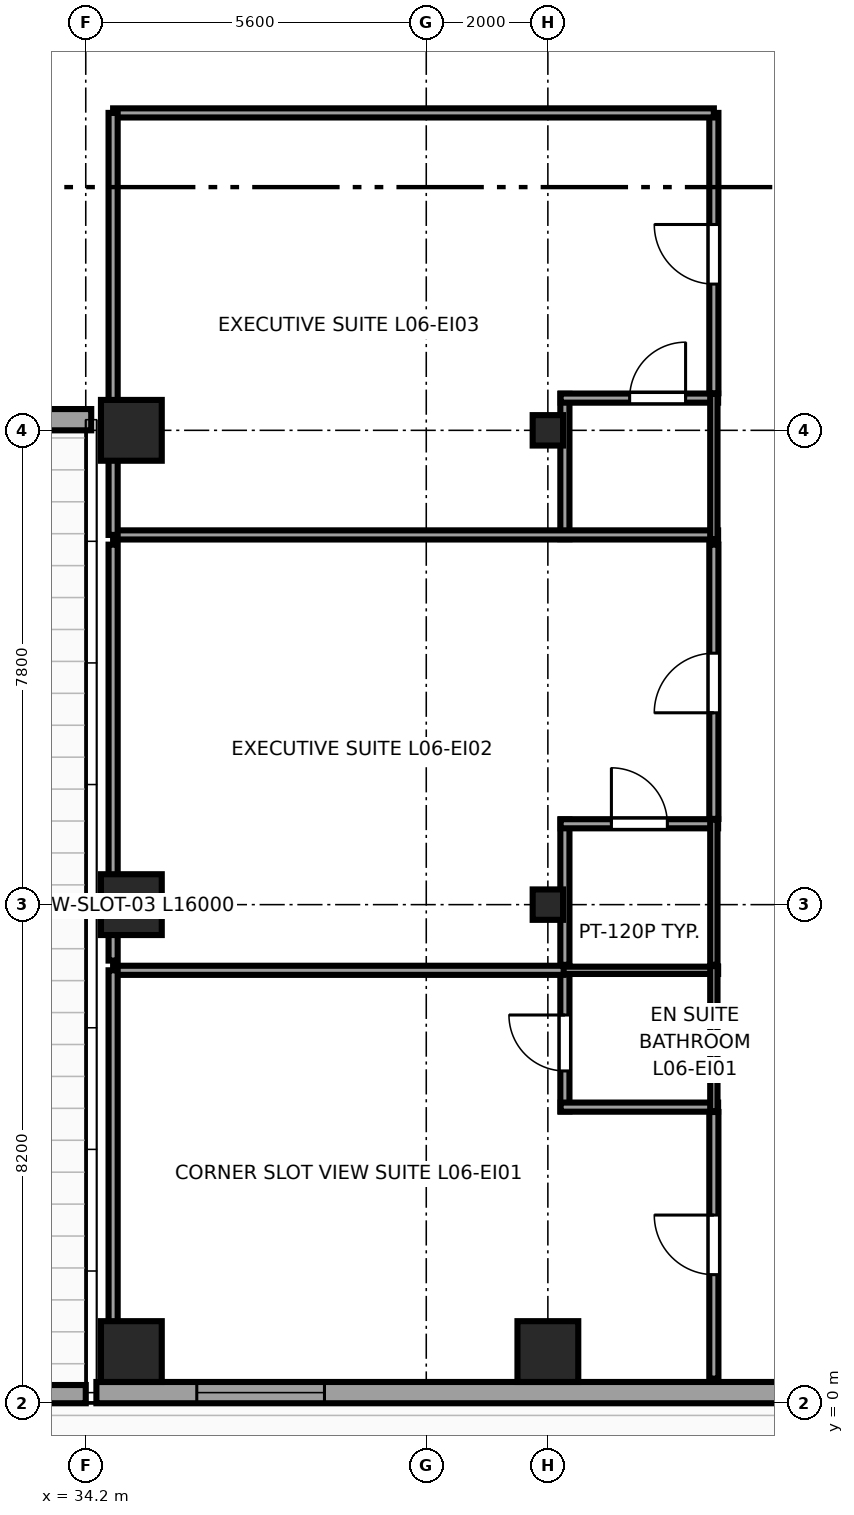
"""IFC4 building model, lengths in metres.
Left out: names, types, materials, properties, quantities, classifications, styles, units other than length and angle.
Written with IfcOpenShell. Run it as: python <this file> out.ifc"""

import sys

from ifc_helpers import new_model, si_unit, direction, frame, frame_2d, origin, origin_2d, place, context, subcontext, project, spatial, rectangle, i_section, extrude, source, transform, mapped, element, fill, save


model = new_model("IFC4")
c1 = context("Model", 3, precision=1e-05, world=origin(), true_north=direction((0.0, 1.0)))
c2 = subcontext(c1, "Body", "Model", "MODEL_VIEW")
j1 = project(units=[si_unit("LENGTHUNIT", "METRE"), si_unit("PLANEANGLEUNIT", "RADIAN")], contexts=[c1])
p1 = place(None, origin())
s1 = spatial("IfcSite", under=j1, at=p1, CompositionType="ELEMENT")
p2 = place(p1, origin())
s2 = spatial("IfcBuilding", under=s1, at=p2, CompositionType="ELEMENT")
p3 = place(p2, frame((0.0, 0.0, 32.0)))
s3 = spatial("IfcBuildingStorey", under=s2, at=p3, CompositionType="ELEMENT", Elevation=32.0)
m1 = source(origin(), c2, "Body", "SweptSolid", [
    extrude(rectangle(XDim=1.0, YDim=1.0, at=origin_2d()), origin(), (0.0, 0.0, 1.0), 3.55),
])
for number, where, z_axis, x_axis in (
    (1, (34.95, 0.85, 0.0), (0.0, 0.0, 1.0), (1.0, 0.0, 0.0)),
    (2, (34.95, 8.2, 0.0), (0.0, 0.0, 1.0), (1.0, 0.0, 0.0)),
    (3, (34.95, 16.0, 0.0), (0.0, 0.0, 1.0), (1.0, 0.0, 0.0)),
    (4, (41.8, 0.85, 0.0), (0.0, 0.0, 1.0), (1.0, 0.0, 0.0)),
):
    element("IfcColumn", number, at=place(p3, frame(where, z_axis=z_axis, x_axis=x_axis)), inside=s3, PredefinedType="COLUMN", context=c2, shape_type="MappedRepresentation", body=[
        mapped(m1, transform((0.0, 0.0, 0.0), x_axis=(1.0, 0.0, 0.0), y_axis=(0.0, 1.0, 0.0), z_axis=(0.0, 0.0, 1.0), scale=1.0)),
    ])
m2 = source(origin(), c2, "Body", "SweptSolid", [
    extrude(i_section(OverallWidth=0.5, OverallDepth=0.5, WebThickness=0.028, FlangeThickness=0.045, at=origin_2d()), origin(), (0.0, 0.0, 1.0), 3.55),
])
for number, where, z_axis, x_axis in (
    (5, (41.8, 8.2, 0.0), (0.0, 0.0, 1.0), (1.0, 0.0, 0.0)),
    (6, (41.8, 16.0, 0.0), (0.0, 0.0, 1.0), (1.0, 0.0, 0.0)),
):
    element("IfcColumn", number, at=place(p3, frame(where, z_axis=z_axis, x_axis=x_axis)), inside=s3, PredefinedType="COLUMN", context=c2, shape_type="MappedRepresentation", body=[
        mapped(m2, transform((0.0, 0.0, 0.0), x_axis=(1.0, 0.0, 0.0), y_axis=(0.0, 1.0, 0.0), z_axis=(0.0, 0.0, 1.0), scale=1.0)),
    ])
p4 = place(p3, frame((22.71, 16.175, 0.0), z_axis=(0.0, 0.0, 1.0), x_axis=(1.0, 0.0, 0.0)))
e7 = element("IfcWall", 7, at=p4, inside=s3, PredefinedType="SOLIDWALL", context=c2, shape_type="SweptSolid", body=[
    extrude(rectangle(XDim=11.58, YDim=0.35, at=frame_2d((5.79, 0.0))), origin(), (0.0, 0.0, 1.0), 2.748),
])
p5 = place(p4, frame((2.145, 0.0, 0.68)))
e8 = element("IfcOpeningElement", 8, at=p5, cuts=e7, PredefinedType="OPENING", context=c2, shape_type="SweptSolid", body=[
    extrude(rectangle(XDim=2.1, YDim=1.9, at=frame_2d((1.05, 0.95))), frame((0.0, 0.185, 0.0), z_axis=(0.0, -1.0, 0.0), x_axis=(1.0, 0.0, 0.0)), (0.0, 0.0, 1.0), 0.37),
])
p6 = place(p4, frame((7.335, 0.0, 0.68)))
e9 = element("IfcOpeningElement", 9, at=p6, cuts=e7, PredefinedType="OPENING", context=c2, shape_type="SweptSolid", body=[
    extrude(rectangle(XDim=2.1, YDim=1.9, at=frame_2d((1.05, 0.95))), frame((0.0, 0.185, 0.0), z_axis=(0.0, -1.0, 0.0), x_axis=(1.0, 0.0, 0.0)), (0.0, 0.0, 1.0), 0.37),
])
p7 = place(p3, frame((34.375, 0.175, 0.0), z_axis=(0.0, 0.0, 1.0), x_axis=(1.0, 0.0, 0.0)))
e10 = element("IfcWall", 10, at=p7, inside=s3, PredefinedType="SOLIDWALL", context=c2, shape_type="SweptSolid", body=[
    extrude(rectangle(XDim=18.008, YDim=0.35, at=frame_2d((9.004, 0.0))), origin(), (0.0, 0.0, 1.0), 3.37),
])
p8 = place(p7, frame((1.651, 0.0, 0.68)))
e11 = element("IfcOpeningElement", 11, at=p8, cuts=e10, PredefinedType="OPENING", context=c2, shape_type="SweptSolid", body=[
    extrude(rectangle(XDim=2.1, YDim=1.9, at=frame_2d((1.05, 0.95))), frame((0.0, 0.185, 0.0), z_axis=(0.0, -1.0, 0.0), x_axis=(1.0, 0.0, 0.0)), (0.0, 0.0, 1.0), 0.37),
])
p9 = place(p7, frame((15.725, 0.0, 0.62)))
e12 = element("IfcOpeningElement", 12, at=p9, cuts=e10, PredefinedType="OPENING", context=c2, shape_type="SweptSolid", body=[
    extrude(rectangle(XDim=1.5, YDim=1.55, at=frame_2d((0.75, 0.775))), frame((0.0, 0.185, 0.0), z_axis=(0.0, -1.0, 0.0), x_axis=(1.0, 0.0, 0.0)), (0.0, 0.0, 1.0), 0.37),
])
p10 = place(p3, frame((22.8, 0.15, 0.0), z_axis=(0.0, 0.0, 1.0), x_axis=(1.0, 0.0, 0.0)))
e13 = element("IfcWall", 13, at=p10, inside=s3, PredefinedType="PARAPET", context=c2, shape_type="SweptSolid", body=[
    extrude(rectangle(XDim=11.4, YDim=0.3, at=frame_2d((5.7, 0.0))), origin(), (0.0, 0.0, 1.0), 1.15),
])
p11 = place(p3, frame((42.08, 4.8, 0.0), z_axis=(0.0, 0.0, 1.0), x_axis=(0.0, 1.0, 0.0)))
e14 = element("IfcWall", 14, at=p11, inside=s3, PredefinedType="PARTITIONING", context=c2, shape_type="SweptSolid", body=[
    extrude(rectangle(XDim=2.39, YDim=0.15, at=frame_2d((1.195, 0.0))), origin(), (0.0, 0.0, 1.0), 3.37),
])
p12 = place(p11, frame((0.665, 0.0, 0.0)))
e15 = element("IfcOpeningElement", 15, at=p12, cuts=e14, PredefinedType="OPENING", context=c2, shape_type="SweptSolid", body=[
    extrude(rectangle(XDim=0.92, YDim=2.01, at=frame_2d((0.46, 1.005))), frame((0.0, 0.085, 0.0), z_axis=(0.0, -1.0, 0.0), x_axis=(1.0, 0.0, 0.0)), (0.0, 0.0, 1.0), 0.17),
])
p13 = place(p3, frame((42.01, 4.87, 0.0), z_axis=(0.0, 0.0, 1.0), x_axis=(1.0, 0.0, 0.0)))
e16 = element("IfcWall", 16, at=p13, inside=s3, PredefinedType="PARTITIONING", context=c2, shape_type="SweptSolid", body=[
    extrude(rectangle(XDim=2.59, YDim=0.15, at=frame_2d((1.295, 0.0))), origin(), (0.0, 0.0, 1.0), 3.37),
])
p14 = place(p3, frame((42.01, 7.12, 0.0), z_axis=(0.0, 0.0, 1.0), x_axis=(1.0, 0.0, 0.0)))
e17 = element("IfcWall", 17, at=p14, inside=s3, PredefinedType="PLUMBINGWALL", context=c2, shape_type="SweptSolid", body=[
    extrude(rectangle(XDim=2.59, YDim=0.12, at=frame_2d((1.295, 0.0))), origin(), (0.0, 0.0, 1.0), 3.37),
])
p15 = place(p3, frame((44.53, 4.8, 0.0), z_axis=(0.0, 0.0, 1.0), x_axis=(0.0, 1.0, 0.0)))
e18 = element("IfcWall", 18, at=p15, inside=s3, PredefinedType="PLUMBINGWALL", context=c2, shape_type="SweptSolid", body=[
    extrude(rectangle(XDim=2.39, YDim=0.12, at=frame_2d((1.195, 0.0))), origin(), (0.0, 0.0, 1.0), 3.37),
])
p16 = place(p3, frame((42.08, 7.21, 0.0), z_axis=(0.0, 0.0, 1.0), x_axis=(0.0, 1.0, 0.0)))
e19 = element("IfcWall", 19, at=p16, inside=s3, PredefinedType="PARTITIONING", context=c2, shape_type="SweptSolid", body=[
    extrude(rectangle(XDim=2.39, YDim=0.15, at=frame_2d((1.195, 0.0))), origin(), (0.0, 0.0, 1.0), 3.37),
])
p17 = place(p3, frame((42.01, 9.53, 0.0), z_axis=(0.0, 0.0, 1.0), x_axis=(1.0, 0.0, 0.0)))
e20 = element("IfcWall", 20, at=p17, inside=s3, PredefinedType="PARTITIONING", context=c2, shape_type="SweptSolid", body=[
    extrude(rectangle(XDim=2.59, YDim=0.15, at=frame_2d((1.295, 0.0))), origin(), (0.0, 0.0, 1.0), 3.37),
])
p18 = place(p17, frame((0.835, 0.0, 0.0)))
e21 = element("IfcOpeningElement", 21, at=p18, cuts=e20, PredefinedType="OPENING", context=c2, shape_type="SweptSolid", body=[
    extrude(rectangle(XDim=0.92, YDim=2.01, at=frame_2d((0.46, 1.005))), frame((0.0, 0.085, 0.0), z_axis=(0.0, -1.0, 0.0), x_axis=(1.0, 0.0, 0.0)), (0.0, 0.0, 1.0), 0.17),
])
p19 = place(p3, frame((44.53, 7.21, 0.0), z_axis=(0.0, 0.0, 1.0), x_axis=(0.0, 1.0, 0.0)))
e22 = element("IfcWall", 22, at=p19, inside=s3, PredefinedType="PLUMBINGWALL", context=c2, shape_type="SweptSolid", body=[
    extrude(rectangle(XDim=2.39, YDim=0.12, at=frame_2d((1.195, 0.0))), origin(), (0.0, 0.0, 1.0), 3.37),
])
p20 = place(p3, frame((42.08, 14.21, 0.0), z_axis=(0.0, 0.0, 1.0), x_axis=(0.0, 1.0, 0.0)))
e23 = element("IfcWall", 23, at=p20, inside=s3, PredefinedType="PARTITIONING", context=c2, shape_type="SweptSolid", body=[
    extrude(rectangle(XDim=2.39, YDim=0.15, at=frame_2d((1.195, 0.0))), origin(), (0.0, 0.0, 1.0), 3.37),
])
p21 = place(p3, frame((34.65, 14.28, 0.0), z_axis=(0.0, 0.0, 1.0), x_axis=(1.0, 0.0, 0.0)))
e24 = element("IfcWall", 24, at=p21, inside=s3, PredefinedType="PARTITIONING", context=c2, shape_type="SweptSolid", body=[
    extrude(rectangle(XDim=9.95, YDim=0.15, at=frame_2d((4.975, 0.0))), origin(), (0.0, 0.0, 1.0), 3.37),
])
p22 = place(p3, frame((42.01, 16.53, 0.0), z_axis=(0.0, 0.0, 1.0), x_axis=(1.0, 0.0, 0.0)))
e25 = element("IfcWall", 25, at=p22, inside=s3, PredefinedType="PARTITIONING", context=c2, shape_type="SweptSolid", body=[
    extrude(rectangle(XDim=2.59, YDim=0.15, at=frame_2d((1.295, 0.0))), origin(), (0.0, 0.0, 1.0), 3.37),
])
p23 = place(p22, frame((1.135, 0.0, 0.0)))
e26 = element("IfcOpeningElement", 26, at=p23, cuts=e25, PredefinedType="OPENING", context=c2, shape_type="SweptSolid", body=[
    extrude(rectangle(XDim=0.92, YDim=2.01, at=frame_2d((0.46, 1.005))), frame((0.0, 0.085, 0.0), z_axis=(0.0, -1.0, 0.0), x_axis=(1.0, 0.0, 0.0)), (0.0, 0.0, 1.0), 0.17),
])
p24 = place(p3, frame((44.53, 14.21, 0.0), z_axis=(0.0, 0.0, 1.0), x_axis=(0.0, 1.0, 0.0)))
e27 = element("IfcWall", 27, at=p24, inside=s3, PredefinedType="PLUMBINGWALL", context=c2, shape_type="SweptSolid", body=[
    extrude(rectangle(XDim=2.39, YDim=0.12, at=frame_2d((1.195, 0.0))), origin(), (0.0, 0.0, 1.0), 3.37),
])
p25 = place(p3, frame((44.53, 0.405, 0.0), z_axis=(0.0, 0.0, 1.0), x_axis=(0.0, 1.0, 0.0)))
e28 = element("IfcWall", 28, at=p25, inside=s3, PredefinedType="PARTITIONING", context=c2, shape_type="SweptSolid", body=[
    extrude(rectangle(XDim=4.385, YDim=0.15, at=frame_2d((2.192, 0.0))), origin(), (0.0, 0.0, 1.0), 3.37),
])
p26 = place(p25, frame((1.71, 0.0, 0.0)))
e29 = element("IfcOpeningElement", 29, at=p26, cuts=e28, PredefinedType="OPENING", context=c2, shape_type="SweptSolid", body=[
    extrude(rectangle(XDim=0.98, YDim=2.12, at=frame_2d((0.49, 1.06))), frame((0.0, 0.085, 0.0), z_axis=(0.0, -1.0, 0.0), x_axis=(1.0, 0.0, 0.0)), (0.0, 0.0, 1.0), 0.17),
])
p27 = place(p3, frame((34.65, 7.12, 0.0), z_axis=(0.0, 0.0, 1.0), x_axis=(1.0, 0.0, 0.0)))
e30 = element("IfcWall", 30, at=p27, inside=s3, PredefinedType="PARTITIONING", context=c2, shape_type="SweptSolid", body=[
    extrude(rectangle(XDim=7.41, YDim=0.15, at=frame_2d((3.705, 0.0))), origin(), (0.0, 0.0, 1.0), 3.37),
])
p28 = place(p3, frame((34.65, 0.405, 0.0), z_axis=(0.0, 0.0, 1.0), x_axis=(0.0, 1.0, 0.0)))
e31 = element("IfcWall", 31, at=p28, inside=s3, PredefinedType="PARTITIONING", context=c2, shape_type="SweptSolid", body=[
    extrude(rectangle(XDim=6.715, YDim=0.15, at=frame_2d((3.357, 0.0))), origin(), (0.0, 0.0, 1.0), 3.37),
])
p29 = place(p3, frame((44.53, 9.61, 0.0), z_axis=(0.0, 0.0, 1.0), x_axis=(0.0, 1.0, 0.0)))
e32 = element("IfcWall", 32, at=p29, inside=s3, PredefinedType="PARTITIONING", context=c2, shape_type="SweptSolid", body=[
    extrude(rectangle(XDim=4.51, YDim=0.15, at=frame_2d((2.255, 0.0))), origin(), (0.0, 0.0, 1.0), 3.37),
])
p30 = place(p29, frame((1.745, 0.0, 0.0)))
e33 = element("IfcOpeningElement", 33, at=p30, cuts=e32, PredefinedType="OPENING", context=c2, shape_type="SweptSolid", body=[
    extrude(rectangle(XDim=0.98, YDim=2.12, at=frame_2d((0.49, 1.06))), frame((0.0, 0.085, 0.0), z_axis=(0.0, -1.0, 0.0), x_axis=(1.0, 0.0, 0.0)), (0.0, 0.0, 1.0), 0.17),
])
p31 = place(p3, frame((34.65, 7.28, 0.0), z_axis=(0.0, 0.0, 1.0), x_axis=(0.0, 1.0, 0.0)))
e34 = element("IfcWall", 34, at=p31, inside=s3, PredefinedType="PARTITIONING", context=c2, shape_type="SweptSolid", body=[
    extrude(rectangle(XDim=6.84, YDim=0.15, at=frame_2d((3.42, 0.0))), origin(), (0.0, 0.0, 1.0), 3.37),
])
p32 = place(p3, frame((44.53, 16.61, 0.0), z_axis=(0.0, 0.0, 1.0), x_axis=(0.0, 1.0, 0.0)))
e35 = element("IfcWall", 35, at=p32, inside=s3, PredefinedType="PARTITIONING", context=c2, shape_type="SweptSolid", body=[
    extrude(rectangle(XDim=4.61, YDim=0.15, at=frame_2d((2.305, 0.0))), origin(), (0.0, 0.0, 1.0), 3.37),
])
p33 = place(p32, frame((1.795, 0.0, 0.0)))
e36 = element("IfcOpeningElement", 36, at=p33, cuts=e35, PredefinedType="OPENING", context=c2, shape_type="SweptSolid", body=[
    extrude(rectangle(XDim=0.98, YDim=2.12, at=frame_2d((0.49, 1.06))), frame((0.0, 0.085, 0.0), z_axis=(0.0, -1.0, 0.0), x_axis=(1.0, 0.0, 0.0)), (0.0, 0.0, 1.0), 0.17),
])
p34 = place(p3, frame((34.65, 21.22, 0.0), z_axis=(0.0, 0.0, 1.0), x_axis=(1.0, 0.0, 0.0)))
e37 = element("IfcWall", 37, at=p34, inside=s3, PredefinedType="PARTITIONING", context=c2, shape_type="SweptSolid", body=[
    extrude(rectangle(XDim=9.88, YDim=0.15, at=frame_2d((4.94, 0.0))), origin(), (0.0, 0.0, 1.0), 3.37),
])
p35 = place(p3, frame((34.65, 14.28, 0.0), z_axis=(0.0, 0.0, 1.0), x_axis=(0.0, 1.0, 0.0)))
e38 = element("IfcWall", 38, at=p35, inside=s3, PredefinedType="PARTITIONING", context=c2, shape_type="SweptSolid", body=[
    extrude(rectangle(XDim=6.94, YDim=0.15, at=frame_2d((3.47, 0.0))), origin(), (0.0, 0.0, 1.0), 3.37),
])
m3 = source(origin(), c2, "Body", "SweptSolid", [
    extrude(rectangle(XDim=2.1, YDim=1.9, at=frame_2d((1.05, 0.95))), frame((0.0, 0.09, 0.0), z_axis=(0.0, -1.0, 0.0), x_axis=(1.0, 0.0, 0.0)), (0.0, 0.0, 1.0), 0.06),
])
p36 = place(p8, origin())
e39 = element("IfcWindow", 39, at=p36, inside=s3, PartitioningType="TRIPLE_PANEL_HORIZONTAL", PredefinedType="WINDOW", context=c2, shape_type="MappedRepresentation", body=[
    mapped(m3, transform((0.0, 0.0, 0.0), x_axis=(1.0, 0.0, 0.0), y_axis=(0.0, 1.0, 0.0), z_axis=(0.0, 0.0, 1.0), scale=1.0)),
])
fill(e11, e39)
m4 = source(origin(), c2, "Body", "SweptSolid", [
    extrude(rectangle(XDim=0.92, YDim=2.01, at=frame_2d((0.46, 1.005))), frame((0.0, 0.025, 0.0), z_axis=(0.0, -1.0, 0.0), x_axis=(1.0, 0.0, 0.0)), (0.0, 0.0, 1.0), 0.05),
])
p37 = place(p12, origin())
e40 = element("IfcDoor", 40, at=p37, inside=s3, OperationType="SINGLE_SWING_RIGHT", PredefinedType="DOOR", context=c2, shape_type="MappedRepresentation", body=[
    mapped(m4, transform((0.0, 0.0, 0.0), x_axis=(1.0, 0.0, 0.0), y_axis=(0.0, 1.0, 0.0), z_axis=(0.0, 0.0, 1.0), scale=1.0)),
])
fill(e15, e40)
p38 = place(p18, origin())
e41 = element("IfcDoor", 41, at=p38, inside=s3, OperationType="SINGLE_SWING_LEFT", PredefinedType="DOOR", context=c2, shape_type="MappedRepresentation", body=[
    mapped(m4, transform((0.0, 0.0, 0.0), x_axis=(1.0, 0.0, 0.0), y_axis=(0.0, 1.0, 0.0), z_axis=(0.0, 0.0, 1.0), scale=1.0)),
])
fill(e21, e41)
p39 = place(p23, origin())
e42 = element("IfcDoor", 42, at=p39, inside=s3, OperationType="SINGLE_SWING_RIGHT", PredefinedType="DOOR", context=c2, shape_type="MappedRepresentation", body=[
    mapped(m4, transform((0.0, 0.0, 0.0), x_axis=(1.0, 0.0, 0.0), y_axis=(0.0, 1.0, 0.0), z_axis=(0.0, 0.0, 1.0), scale=1.0)),
])
fill(e26, e42)
m5 = source(origin(), c2, "Body", "SweptSolid", [
    extrude(rectangle(XDim=0.98, YDim=2.12, at=frame_2d((0.49, 1.06))), frame((0.0, 0.025, 0.0), z_axis=(0.0, -1.0, 0.0), x_axis=(1.0, 0.0, 0.0)), (0.0, 0.0, 1.0), 0.05),
])
p40 = place(p26, origin())
e43 = element("IfcDoor", 43, at=p40, inside=s3, OperationType="SINGLE_SWING_RIGHT", PredefinedType="DOOR", context=c2, shape_type="MappedRepresentation", body=[
    mapped(m5, transform((0.0, 0.0, 0.0), x_axis=(1.0, 0.0, 0.0), y_axis=(0.0, 1.0, 0.0), z_axis=(0.0, 0.0, 1.0), scale=1.0)),
])
fill(e29, e43)
p41 = place(p30, origin())
e44 = element("IfcDoor", 44, at=p41, inside=s3, OperationType="SINGLE_SWING_LEFT", PredefinedType="DOOR", context=c2, shape_type="MappedRepresentation", body=[
    mapped(m5, transform((0.0, 0.0, 0.0), x_axis=(1.0, 0.0, 0.0), y_axis=(0.0, 1.0, 0.0), z_axis=(0.0, 0.0, 1.0), scale=1.0)),
])
fill(e33, e44)
p42 = place(p33, origin())
e45 = element("IfcDoor", 45, at=p42, inside=s3, OperationType="SINGLE_SWING_RIGHT", PredefinedType="DOOR", context=c2, shape_type="MappedRepresentation", body=[
    mapped(m5, transform((0.0, 0.0, 0.0), x_axis=(1.0, 0.0, 0.0), y_axis=(0.0, 1.0, 0.0), z_axis=(0.0, 0.0, 1.0), scale=1.0)),
])
fill(e36, e45)
save(model, sys.argv[1])
